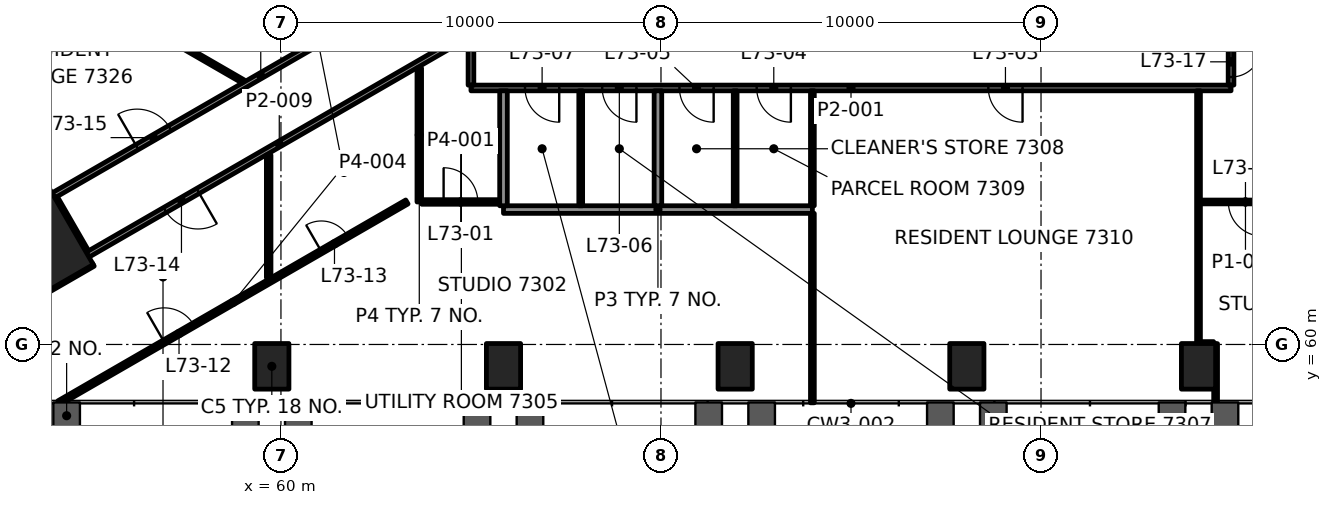
"""IFC4 building model, lengths in metres.
Left out: names, types, materials, properties, quantities, classifications, styles, units other than length and angle.
Written with IfcOpenShell. Run it as: python <this file> out.ifc"""

import sys

from ifc_helpers import new_model, si_unit, direction, frame, frame_2d, origin, origin_2d, place, context, subcontext, project, spatial, rectangle, hollow_rectangle, extrude, element, fill, save


model = new_model("IFC4")
c1 = context("Model", 3, precision=1e-05, world=origin(), true_north=direction((0.0, 1.0)))
c2 = subcontext(c1, "Body", "Model", "MODEL_VIEW")
j1 = project(units=[si_unit("LENGTHUNIT", "METRE"), si_unit("PLANEANGLEUNIT", "RADIAN")], contexts=[c1])
p1 = place(None, origin())
s1 = spatial("IfcSite", under=j1, at=p1, CompositionType="ELEMENT")
p2 = place(p1, origin())
s2 = spatial("IfcBuilding", under=s1, at=p2, CompositionType="ELEMENT")
p3 = place(p2, frame((0.0, 0.0, 302.1)))
s3 = spatial("IfcBuildingStorey", under=s2, at=p3, CompositionType="ELEMENT", Elevation=302.1)
p4 = place(p3, frame((53.423, 62.542, 0.0), z_axis=(0.0, 0.0, 1.0), x_axis=(0.5, -0.866025403784, 0.0)))
e1 = element("IfcColumn", 1, at=p4, inside=s3, PredefinedType="COLUMN", context=c2, shape_type="SweptSolid", body=[
    extrude(rectangle(XDim=2.4, YDim=2.4, at=origin_2d()), origin(), (0.0, 0.0, 1.0), 3.5),
])
for number, where, z_axis, x_axis in (
    (2, (59.76, 59.425, -0.0), (0.0, 0.0, 1.0), (1.0, 0.0, 0.0)),
    (3, (65.856, 59.425, -0.0), (0.0, 0.0, 1.0), (1.0, 0.0, 0.0)),
    (4, (71.952, 59.425, -0.0), (0.0, 0.0, 1.0), (1.0, 0.0, 0.0)),
    (5, (78.048, 59.425, -0.0), (0.0, 0.0, 1.0), (1.0, 0.0, 0.0)),
    (6, (84.144, 59.425, -0.0), (0.0, 0.0, 1.0), (1.0, 0.0, 0.0)),
):
    element("IfcColumn", number, at=place(p3, frame(where, z_axis=z_axis, x_axis=x_axis)), inside=s3, PredefinedType="COLUMN", context=c2, shape_type="SweptSolid", body=[
        extrude(hollow_rectangle(XDim=0.9, YDim=1.2, WallThickness=0.06, at=origin_2d()), origin(), (0.0, 0.0, 1.0), 3.5),
    ])
p5 = place(p3, frame((84.194, 60.025, 0.0), z_axis=(0.0, 0.0, 1.0), x_axis=(1.0, 0.0, 0.0)))
e7 = element("IfcWall", 7, at=p5, inside=s3, PredefinedType="PARTITIONING", context=c2, shape_type="SweptSolid", body=[
    extrude(rectangle(XDim=0.347, YDim=0.1, at=frame_2d((0.173, 0.0))), origin(), (0.0, 0.0, 1.0), 2.7),
])
p6 = place(p3, frame((65.856, 63.55, 0.0), z_axis=(0.0, 0.0, 1.0), x_axis=(1.0, 0.0, 0.0)))
e8 = element("IfcWall", 8, at=p6, inside=s3, PredefinedType="PARTITIONING", context=c2, shape_type="SweptSolid", body=[
    extrude(rectangle(XDim=8.128, YDim=0.2, at=frame_2d((4.064, 0.0))), origin(), (0.0, 0.0, 1.0), 2.7),
])
p7 = place(p3, frame((63.704, 63.75, 0.0), z_axis=(0.0, 0.0, 1.0), x_axis=(1.0, 0.0, 0.0)))
e9 = element("IfcWall", 9, at=p7, inside=s3, PredefinedType="PARTITIONING", context=c2, shape_type="SweptSolid", body=[
    extrude(rectangle(XDim=2.052, YDim=0.12, at=frame_2d((1.026, 0.0))), origin(), (0.0, 0.0, 1.0), 2.7),
])
p8 = place(p7, frame((0.576, 0.0, 0.0)))
e10 = element("IfcOpeningElement", 10, at=p8, cuts=e9, PredefinedType="OPENING", context=c2, shape_type="SweptSolid", body=[
    extrude(rectangle(XDim=0.9, YDim=2.1, at=frame_2d((0.45, 1.05))), frame((0.0, 0.07, 0.0), z_axis=(0.0, -1.0, 0.0), x_axis=(1.0, 0.0, 0.0)), (0.0, 0.0, 1.0), 0.14),
])
p9 = place(p3, frame((86.566, 63.75, 0.0), z_axis=(0.0, 0.0, 1.0), x_axis=(-1.0, 0.0, 0.0)))
e11 = element("IfcWall", 11, at=p9, inside=s3, PredefinedType="PARTITIONING", context=c2, shape_type="SweptSolid", body=[
    extrude(rectangle(XDim=2.372, YDim=0.1, at=frame_2d((1.186, 0.0))), origin(), (0.0, 0.0, 1.0), 2.7),
])
p10 = place(p9, frame((0.736, 0.0, 0.0)))
e12 = element("IfcOpeningElement", 12, at=p10, cuts=e11, PredefinedType="OPENING", context=c2, shape_type="SweptSolid", body=[
    extrude(rectangle(XDim=0.9, YDim=2.1, at=frame_2d((0.45, 1.05))), frame((0.0, 0.06, 0.0), z_axis=(0.0, -1.0, 0.0), x_axis=(1.0, 0.0, 0.0)), (0.0, 0.0, 1.0), 0.12),
])
p11 = place(p3, frame((85.0, 66.75, 0.0), z_axis=(0.0, 0.0, 1.0), x_axis=(-1.0, 0.0, 0.0)))
e13 = element("IfcWall", 13, at=p11, inside=s3, PredefinedType="PARTITIONING", context=c2, shape_type="SweptSolid", body=[
    extrude(rectangle(XDim=20.0, YDim=0.15, at=frame_2d((10.0, 0.0))), origin(), (0.0, 0.0, 1.0), 2.7),
])
p12 = place(p11, frame((5.486, 0.0, 0.0)))
e14 = element("IfcOpeningElement", 14, at=p12, cuts=e13, PredefinedType="OPENING", context=c2, shape_type="SweptSolid", body=[
    extrude(rectangle(XDim=0.9, YDim=2.1, at=frame_2d((0.45, 1.05))), frame((0.0, 0.085, 0.0), z_axis=(0.0, -1.0, 0.0), x_axis=(1.0, 0.0, 0.0)), (0.0, 0.0, 1.0), 0.17),
])
p13 = place(p11, frame((11.582, 0.0, 0.0)))
e15 = element("IfcOpeningElement", 15, at=p13, cuts=e13, PredefinedType="OPENING", context=c2, shape_type="SweptSolid", body=[
    extrude(rectangle(XDim=0.9, YDim=2.1, at=frame_2d((0.45, 1.05))), frame((0.0, 0.085, 0.0), z_axis=(0.0, -1.0, 0.0), x_axis=(1.0, 0.0, 0.0)), (0.0, 0.0, 1.0), 0.17),
])
p14 = place(p11, frame((13.614, 0.0, 0.0)))
e16 = element("IfcOpeningElement", 16, at=p14, cuts=e13, PredefinedType="OPENING", context=c2, shape_type="SweptSolid", body=[
    extrude(rectangle(XDim=0.9, YDim=2.1, at=frame_2d((0.45, 1.05))), frame((0.0, 0.085, 0.0), z_axis=(0.0, -1.0, 0.0), x_axis=(1.0, 0.0, 0.0)), (0.0, 0.0, 1.0), 0.17),
])
p15 = place(p11, frame((15.646, 0.0, 0.0)))
e17 = element("IfcOpeningElement", 17, at=p15, cuts=e13, PredefinedType="OPENING", context=c2, shape_type="SweptSolid", body=[
    extrude(rectangle(XDim=0.9, YDim=2.1, at=frame_2d((0.45, 1.05))), frame((0.0, 0.085, 0.0), z_axis=(0.0, -1.0, 0.0), x_axis=(1.0, 0.0, 0.0)), (0.0, 0.0, 1.0), 0.17),
])
p16 = place(p11, frame((17.678, 0.0, 0.0)))
e18 = element("IfcOpeningElement", 18, at=p16, cuts=e13, PredefinedType="OPENING", context=c2, shape_type="SweptSolid", body=[
    extrude(rectangle(XDim=0.9, YDim=2.1, at=frame_2d((0.45, 1.05))), frame((0.0, 0.085, 0.0), z_axis=(0.0, -1.0, 0.0), x_axis=(1.0, 0.0, 0.0)), (0.0, 0.0, 1.0), 0.17),
])
p17 = place(p3, frame((54.16, 58.465, 0.0), z_axis=(0.0, 0.0, 1.0), x_axis=(0.866034434898, 0.499984357326, 0.0)))
e19 = element("IfcWall", 19, at=p17, inside=s3, PredefinedType="PARTITIONING", context=c2, shape_type="SweptSolid", body=[
    extrude(rectangle(XDim=10.571, YDim=0.12, at=frame_2d((5.285, 0.0))), origin(), (0.0, 0.0, 1.0), 2.7),
])
p18 = place(p17, frame((3.197, 0.0, 0.0)))
e20 = element("IfcOpeningElement", 20, at=p18, cuts=e19, PredefinedType="OPENING", context=c2, shape_type="SweptSolid", body=[
    extrude(rectangle(XDim=0.9, YDim=2.1, at=frame_2d((0.45, 1.05))), frame((0.0, 0.07, 0.0), z_axis=(0.0, -1.0, 0.0), x_axis=(1.0, 0.0, 0.0)), (0.0, 0.0, 1.0), 0.14),
])
p19 = place(p17, frame((7.97, 0.0, 0.0)))
e21 = element("IfcOpeningElement", 21, at=p19, cuts=e19, PredefinedType="OPENING", context=c2, shape_type="SweptSolid", body=[
    extrude(rectangle(XDim=0.8, YDim=2.1, at=frame_2d((0.4, 1.05))), frame((0.0, 0.07, 0.0), z_axis=(0.0, -1.0, 0.0), x_axis=(1.0, 0.0, 0.0)), (0.0, 0.0, 1.0), 0.14),
])
p20 = place(p3, frame((52.984, 60.904, 0.0), z_axis=(0.0, 0.0, 1.0), x_axis=(0.866011011868, 0.500024926702, 0.0)))
e22 = element("IfcWall", 22, at=p20, inside=s3, PredefinedType="PARTITIONING", context=c2, shape_type="SweptSolid", body=[
    extrude(rectangle(XDim=2.399, YDim=0.1, at=frame_2d((1.199, 0.0))), origin(), (0.0, 0.0, 1.0), 2.7),
])
p21 = place(p3, frame((65.0, 68.187, 0.0), z_axis=(0.0, 0.0, 1.0), x_axis=(-0.866026430432, -0.49999822179, 0.0)))
e23 = element("IfcWall", 23, at=p21, inside=s3, PredefinedType="PARTITIONING", context=c2, shape_type="SweptSolid", body=[
    extrude(rectangle(XDim=11.648, YDim=0.15, at=frame_2d((5.824, 0.0))), origin(), (0.0, 0.0, 1.0), 2.547),
])
p22 = place(p21, frame((8.296, 0.0, 0.0)))
e24 = element("IfcOpeningElement", 24, at=p22, cuts=e23, PredefinedType="OPENING", context=c2, shape_type="SweptSolid", body=[
    extrude(rectangle(XDim=1.0, YDim=2.1, at=frame_2d((0.5, 1.05))), frame((0.0, 0.085, 0.0), z_axis=(0.0, -1.0, 0.0), x_axis=(1.0, 0.0, 0.0)), (0.0, 0.0, 1.0), 0.17),
])
p23 = place(p3, frame((54.012, 63.922, 0.0), z_axis=(0.0, 0.0, 1.0), x_axis=(0.866028779199, 0.499994153564, 0.0)))
e25 = element("IfcWall", 25, at=p23, inside=s3, PredefinedType="PARTITIONING", context=c2, shape_type="SweptSolid", body=[
    extrude(rectangle(XDim=12.601, YDim=0.15, at=frame_2d((6.3, 0.0))), origin(), (0.0, 0.0, 1.0), 2.7),
])
p24 = place(p23, frame((2.542, 0.0, 0.0)))
e26 = element("IfcOpeningElement", 26, at=p24, cuts=e25, PredefinedType="OPENING", context=c2, shape_type="SweptSolid", body=[
    extrude(rectangle(XDim=1.0, YDim=2.1, at=frame_2d((0.5, 1.05))), frame((0.0, 0.085, 0.0), z_axis=(0.0, -1.0, 0.0), x_axis=(1.0, 0.0, 0.0)), (0.0, 0.0, 1.0), 0.17),
])
p25 = place(p23, frame((8.639, 0.0, 0.0)))
e27 = element("IfcOpeningElement", 27, at=p25, cuts=e25, PredefinedType="OPENING", context=c2, shape_type="SweptSolid", body=[
    extrude(rectangle(XDim=1.0, YDim=2.1, at=frame_2d((0.5, 1.05))), frame((0.0, 0.085, 0.0), z_axis=(0.0, -1.0, 0.0), x_axis=(1.0, 0.0, 0.0)), (0.0, 0.0, 1.0), 0.17),
])
p26 = place(p3, frame((85.0, 68.051, 0.0), z_axis=(0.0, 0.0, 1.0), x_axis=(0.0, -1.0, 0.0)))
e28 = element("IfcWall", 28, at=p26, inside=s3, PredefinedType="PARTITIONING", context=c2, shape_type="SweptSolid", body=[
    extrude(rectangle(XDim=1.226, YDim=0.15, at=frame_2d((0.613, 0.0))), origin(), (0.0, 0.0, 1.0), 2.547),
])
p27 = place(p26, frame((0.213, 0.0, 0.0)))
e29 = element("IfcOpeningElement", 29, at=p27, cuts=e28, PredefinedType="OPENING", context=c2, shape_type="SweptSolid", body=[
    extrude(rectangle(XDim=0.8, YDim=2.1, at=frame_2d((0.4, 1.05))), frame((0.0, 0.085, 0.0), z_axis=(0.0, -1.0, 0.0), x_axis=(1.0, 0.0, 0.0)), (0.0, 0.0, 1.0), 0.17),
])
p28 = place(p3, frame((84.594, 58.465, 0.0), z_axis=(0.0, 0.0, 1.0), x_axis=(0.0, 1.0, 0.0)))
e30 = element("IfcWall", 30, at=p28, inside=s3, PredefinedType="PARTITIONING", context=c2, shape_type="SweptSolid", body=[
    extrude(rectangle(XDim=1.557, YDim=0.1, at=frame_2d((0.778, 0.0))), origin(), (0.0, 0.0, 1.0), 2.7),
])
p29 = place(p3, frame((84.144, 60.025, 0.0), z_axis=(0.0, 0.0, 1.0), x_axis=(0.0, 1.0, 0.0)))
e31 = element("IfcWall", 31, at=p29, inside=s3, PredefinedType="PARTITIONING", context=c2, shape_type="SweptSolid", body=[
    extrude(rectangle(XDim=6.65, YDim=0.1, at=frame_2d((3.325, 0.0))), origin(), (0.0, 0.0, 1.0), 2.7),
])
p30 = place(p3, frame((73.984, 58.465, 0.0), z_axis=(0.0, 0.0, 1.0), x_axis=(0.0, 1.0, 0.0)))
e32 = element("IfcWall", 32, at=p30, inside=s3, PredefinedType="PARTITIONING", context=c2, shape_type="SweptSolid", body=[
    extrude(rectangle(XDim=4.985, YDim=0.1, at=frame_2d((2.493, 0.0))), origin(), (0.0, 0.0, 1.0), 2.688),
])
p31 = place(p3, frame((71.952, 63.65, 0.0), z_axis=(0.0, 0.0, 1.0), x_axis=(0.0, 1.0, 0.0)))
e33 = element("IfcWall", 33, at=p31, inside=s3, PredefinedType="PARTITIONING", context=c2, shape_type="SweptSolid", body=[
    extrude(rectangle(XDim=3.025, YDim=0.1, at=frame_2d((1.513, 0.0))), origin(), (0.0, 0.0, 1.0), 2.7),
])
p32 = place(p3, frame((69.92, 63.65, 0.0), z_axis=(0.0, 0.0, 1.0), x_axis=(0.0, 1.0, 0.0)))
e34 = element("IfcWall", 34, at=p32, inside=s3, PredefinedType="PARTITIONING", context=c2, shape_type="SweptSolid", body=[
    extrude(rectangle(XDim=3.025, YDim=0.2, at=frame_2d((1.513, 0.0))), origin(), (0.0, 0.0, 1.0), 2.7),
])
p33 = place(p3, frame((67.888, 63.65, 0.0), z_axis=(0.0, 0.0, 1.0), x_axis=(0.0, 1.0, 0.0)))
e35 = element("IfcWall", 35, at=p33, inside=s3, PredefinedType="PARTITIONING", context=c2, shape_type="SweptSolid", body=[
    extrude(rectangle(XDim=3.025, YDim=0.1, at=frame_2d((1.513, 0.0))), origin(), (0.0, 0.0, 1.0), 2.7),
])
p34 = place(p3, frame((65.856, 63.65, 0.0), z_axis=(0.0, 0.0, 1.0), x_axis=(0.0, 1.0, 0.0)))
e36 = element("IfcWall", 36, at=p34, inside=s3, PredefinedType="PARTITIONING", context=c2, shape_type="SweptSolid", body=[
    extrude(rectangle(XDim=3.025, YDim=0.2, at=frame_2d((1.513, 0.0))), origin(), (0.0, 0.0, 1.0), 2.7),
])
p35 = place(p3, frame((65.0, 66.825, 0.0), z_axis=(0.0, 0.0, 1.0), x_axis=(0.0, 1.0, 0.0)))
e37 = element("IfcWall", 37, at=p35, inside=s3, PredefinedType="PARTITIONING", context=c2, shape_type="SweptSolid", body=[
    extrude(rectangle(XDim=1.226, YDim=0.15, at=frame_2d((0.613, 0.0))), origin(), (0.0, 0.0, 1.0), 2.547),
])
p36 = place(p3, frame((63.64, 63.75, 0.0), z_axis=(0.0, 0.0, 1.0), x_axis=(0.0, 1.0, 0.0)))
e38 = element("IfcWall", 38, at=p36, inside=s3, PredefinedType="PARTITIONING", context=c2, shape_type="SweptSolid", body=[
    extrude(rectangle(XDim=3.525, YDim=0.12, at=frame_2d((1.763, 0.0))), origin(), (0.0, 0.0, 1.0), 2.547),
])
p37 = place(p3, frame((59.677, 61.759, 0.0), z_axis=(0.0, 0.0, 1.0), x_axis=(0.0, 1.0, 0.0)))
e39 = element("IfcWall", 39, at=p37, inside=s3, PredefinedType="PARTITIONING", context=c2, shape_type="SweptSolid", body=[
    extrude(rectangle(XDim=3.228, YDim=0.12, at=frame_2d((1.614, 0.0))), origin(), (0.0, 0.0, 1.0), 2.7),
])
p38 = place(p3, frame((54.872, 62.433, 0.0), z_axis=(0.0, 0.0, 1.0), x_axis=(-0.499988108725, 0.866032269107, 0.0)))
e40 = element("IfcWall", 40, at=p38, inside=s3, PredefinedType="PARTITIONING", context=c2, shape_type="SweptSolid", body=[
    extrude(rectangle(XDim=1.644, YDim=0.15, at=frame_2d((0.822, 0.0))), origin(), (0.0, 0.0, 1.0), 2.547),
])
p39 = place(p3, frame((85.075, 70.222, 0.0), z_axis=(0.0, 0.0, 1.0), x_axis=(0.866023935413, -0.500002543286, 0.0)))
e41 = element("IfcWall", 41, at=p39, inside=s3, PredefinedType="PARTITIONING", context=c2, shape_type="SweptSolid", body=[
    extrude(rectangle(XDim=12.601, YDim=0.15, at=frame_2d((6.3, 0.0))), origin(), (0.0, 0.0, 1.0), 2.7),
])
p40 = place(p39, frame((9.249, 0.0, 0.0)))
e42 = element("IfcOpeningElement", 42, at=p40, cuts=e41, PredefinedType="OPENING", context=c2, shape_type="SweptSolid", body=[
    extrude(rectangle(XDim=1.0, YDim=2.1, at=frame_2d((0.5, 1.05))), frame((0.0, 0.085, 0.0), z_axis=(0.0, -1.0, 0.0), x_axis=(1.0, 0.0, 0.0)), (0.0, 0.0, 1.0), 0.17),
])
p41 = place(p3, frame((95.088, 62.363, 0.0), z_axis=(0.0, 0.0, 1.0), x_axis=(-0.866026430432, 0.49999822179, 0.0)))
e43 = element("IfcWall", 43, at=p41, inside=s3, PredefinedType="PARTITIONING", context=c2, shape_type="SweptSolid", body=[
    extrude(rectangle(XDim=11.648, YDim=0.15, at=frame_2d((5.824, 0.0))), origin(), (0.0, 0.0, 1.0), 2.547),
])
p42 = place(p3, frame((59.005, 66.921, 0.0), z_axis=(0.0, 0.0, 1.0), x_axis=(-0.866022552607, 0.500004938352, 0.0)))
e44 = element("IfcWall", 44, at=p42, inside=s3, PredefinedType="PARTITIONING", context=c2, shape_type="SweptSolid", body=[
    extrude(rectangle(XDim=5.162, YDim=0.1, at=frame_2d((2.581, 0.0))), origin(), (0.0, 0.0, 1.0), 2.7),
])
p43 = place(p3, frame((73.984, 63.65, 0.0), z_axis=(0.0, 0.0, 1.0), x_axis=(0.0, 1.0, 0.0)))
e45 = element("IfcWall", 45, at=p43, inside=s3, PredefinedType="PARTITIONING", context=c2, shape_type="SweptSolid", body=[
    extrude(rectangle(XDim=3.025, YDim=0.1, at=frame_2d((1.513, 0.0))), origin(), (0.0, 0.0, 1.0), 2.7),
])
p44 = place(p8, origin())
e46 = element("IfcDoor", 46, at=p44, inside=s3, OperationType="SINGLE_SWING_LEFT", PredefinedType="DOOR", context=c2, shape_type="SweptSolid", body=[
    extrude(rectangle(XDim=0.9, YDim=2.1, at=frame_2d((0.45, 1.05))), frame((0.0, 0.025, 0.0), z_axis=(0.0, -1.0, 0.0), x_axis=(1.0, 0.0, 0.0)), (0.0, 0.0, 1.0), 0.05),
])
fill(e10, e46)
p45 = place(p10, origin())
e47 = element("IfcDoor", 47, at=p45, inside=s3, OperationType="SINGLE_SWING_LEFT", PredefinedType="DOOR", context=c2, shape_type="SweptSolid", body=[
    extrude(rectangle(XDim=0.9, YDim=2.1, at=frame_2d((0.45, 1.05))), frame((0.0, 0.025, 0.0), z_axis=(0.0, -1.0, 0.0), x_axis=(1.0, 0.0, 0.0)), (0.0, 0.0, 1.0), 0.05),
])
fill(e12, e47)
p46 = place(p12, origin())
e48 = element("IfcDoor", 48, at=p46, inside=s3, OperationType="SINGLE_SWING_RIGHT", PredefinedType="DOOR", context=c2, shape_type="SweptSolid", body=[
    extrude(rectangle(XDim=0.9, YDim=2.1, at=frame_2d((0.45, 1.05))), frame((0.0, 0.025, 0.0), z_axis=(0.0, -1.0, 0.0), x_axis=(1.0, 0.0, 0.0)), (0.0, 0.0, 1.0), 0.05),
])
fill(e14, e48)
p47 = place(p13, origin())
e49 = element("IfcDoor", 49, at=p47, inside=s3, OperationType="SINGLE_SWING_LEFT", PredefinedType="DOOR", context=c2, shape_type="SweptSolid", body=[
    extrude(rectangle(XDim=0.9, YDim=2.1, at=frame_2d((0.45, 1.05))), frame((0.0, 0.025, 0.0), z_axis=(0.0, -1.0, 0.0), x_axis=(1.0, 0.0, 0.0)), (0.0, 0.0, 1.0), 0.05),
])
fill(e15, e49)
p48 = place(p14, origin())
e50 = element("IfcDoor", 50, at=p48, inside=s3, OperationType="SINGLE_SWING_RIGHT", PredefinedType="DOOR", context=c2, shape_type="SweptSolid", body=[
    extrude(rectangle(XDim=0.9, YDim=2.1, at=frame_2d((0.45, 1.05))), frame((0.0, 0.025, 0.0), z_axis=(0.0, -1.0, 0.0), x_axis=(1.0, 0.0, 0.0)), (0.0, 0.0, 1.0), 0.05),
])
fill(e16, e50)
p49 = place(p15, origin())
e51 = element("IfcDoor", 51, at=p49, inside=s3, OperationType="SINGLE_SWING_LEFT", PredefinedType="DOOR", context=c2, shape_type="SweptSolid", body=[
    extrude(rectangle(XDim=0.9, YDim=2.1, at=frame_2d((0.45, 1.05))), frame((0.0, 0.025, 0.0), z_axis=(0.0, -1.0, 0.0), x_axis=(1.0, 0.0, 0.0)), (0.0, 0.0, 1.0), 0.05),
])
fill(e17, e51)
p50 = place(p16, origin())
e52 = element("IfcDoor", 52, at=p50, inside=s3, OperationType="SINGLE_SWING_RIGHT", PredefinedType="DOOR", context=c2, shape_type="SweptSolid", body=[
    extrude(rectangle(XDim=0.9, YDim=2.1, at=frame_2d((0.45, 1.05))), frame((0.0, 0.025, 0.0), z_axis=(0.0, -1.0, 0.0), x_axis=(1.0, 0.0, 0.0)), (0.0, 0.0, 1.0), 0.05),
])
fill(e18, e52)
p51 = place(p18, origin())
e53 = element("IfcDoor", 53, at=p51, inside=s3, OperationType="SINGLE_SWING_RIGHT", PredefinedType="DOOR", context=c2, shape_type="SweptSolid", body=[
    extrude(rectangle(XDim=0.9, YDim=2.1, at=frame_2d((0.45, 1.05))), frame((0.0, 0.025, 0.0), z_axis=(0.0, -1.0, 0.0), x_axis=(1.0, 0.0, 0.0)), (0.0, 0.0, 1.0), 0.05),
])
fill(e20, e53)
p52 = place(p19, origin())
e54 = element("IfcDoor", 54, at=p52, inside=s3, OperationType="SINGLE_SWING_RIGHT", PredefinedType="DOOR", context=c2, shape_type="SweptSolid", body=[
    extrude(rectangle(XDim=0.8, YDim=2.1, at=frame_2d((0.4, 1.05))), frame((0.0, 0.025, 0.0), z_axis=(0.0, -1.0, 0.0), x_axis=(1.0, 0.0, 0.0)), (0.0, 0.0, 1.0), 0.05),
])
fill(e21, e54)
p53 = place(p22, origin())
e55 = element("IfcDoor", 55, at=p53, inside=s3, OperationType="SINGLE_SWING_RIGHT", PredefinedType="DOOR", context=c2, shape_type="SweptSolid", body=[
    extrude(rectangle(XDim=1.0, YDim=2.1, at=frame_2d((0.5, 1.05))), frame((0.0, 0.025, 0.0), z_axis=(0.0, -1.0, 0.0), x_axis=(1.0, 0.0, 0.0)), (0.0, 0.0, 1.0), 0.05),
])
fill(e24, e55)
p54 = place(p24, origin())
e56 = element("IfcDoor", 56, at=p54, inside=s3, OperationType="SINGLE_SWING_LEFT", PredefinedType="DOOR", context=c2, shape_type="SweptSolid", body=[
    extrude(rectangle(XDim=1.0, YDim=2.1, at=frame_2d((0.5, 1.05))), frame((0.0, 0.025, 0.0), z_axis=(0.0, -1.0, 0.0), x_axis=(1.0, 0.0, 0.0)), (0.0, 0.0, 1.0), 0.05),
])
fill(e26, e56)
p55 = place(p27, origin())
e57 = element("IfcDoor", 57, at=p55, inside=s3, OperationType="SINGLE_SWING_RIGHT", PredefinedType="DOOR", context=c2, shape_type="SweptSolid", body=[
    extrude(rectangle(XDim=0.8, YDim=2.1, at=frame_2d((0.4, 1.05))), frame((0.0, 0.025, 0.0), z_axis=(0.0, -1.0, 0.0), x_axis=(1.0, 0.0, 0.0)), (0.0, 0.0, 1.0), 0.05),
])
fill(e29, e57)
save(model, sys.argv[1])
